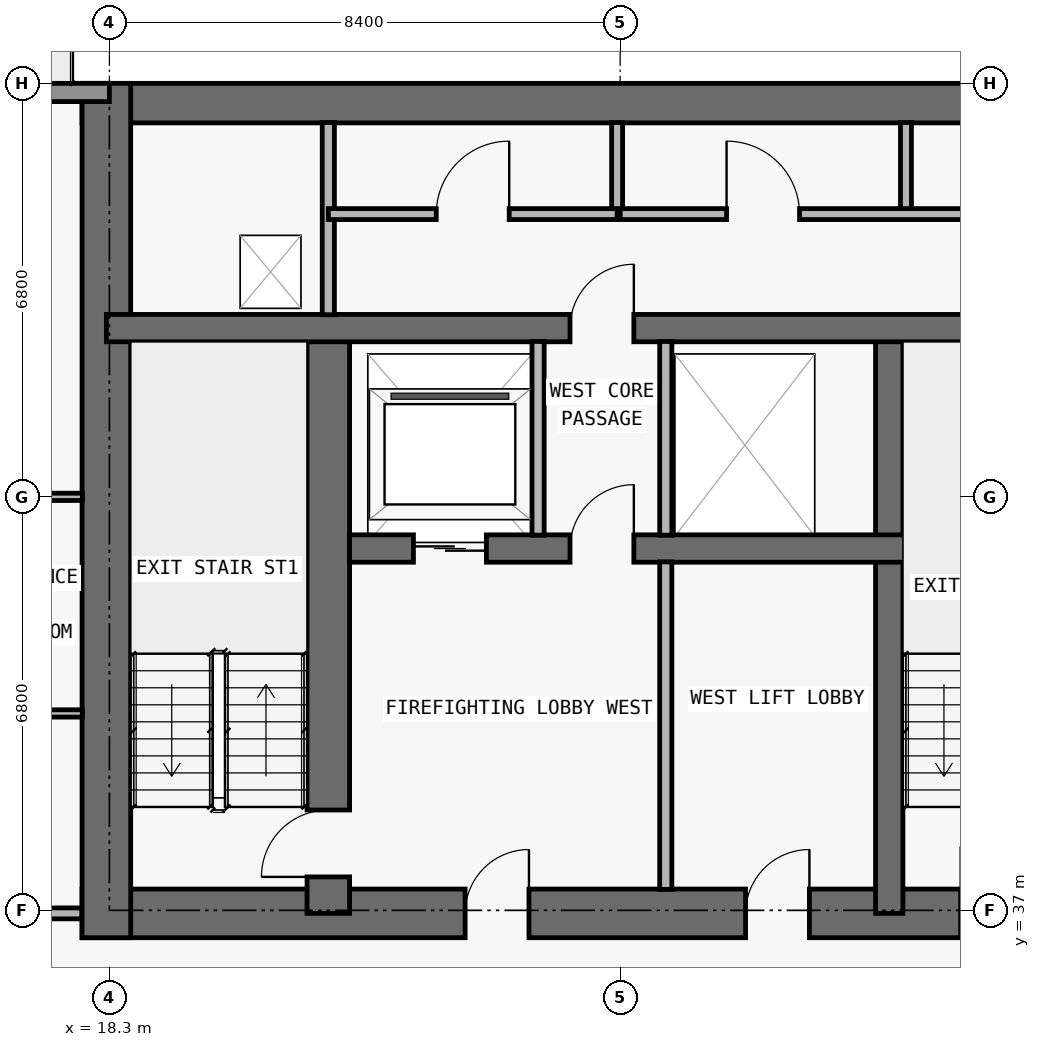
"""IFC4 building model, lengths in metres.
Left out: names, types, materials, properties, quantities, classifications, styles, units other than length and angle.
Written with IfcOpenShell. Run it as: python <this file> out.ifc"""

import sys

from ifc_helpers import new_model, si_unit, direction, frame, frame_2d, origin, place, context, subcontext, project, spatial, rectangle, extrude, element, fill, save


model = new_model("IFC4")
c1 = context("Model", 3, precision=1e-05, world=origin(), true_north=direction((0.0, 1.0)))
c2 = subcontext(c1, "Body", "Model", "MODEL_VIEW")
j1 = project(units=[si_unit("LENGTHUNIT", "METRE"), si_unit("PLANEANGLEUNIT", "RADIAN")], contexts=[c1])
p1 = place(None, origin())
s1 = spatial("IfcSite", under=j1, at=p1, CompositionType="ELEMENT")
p2 = place(p1, origin())
s2 = spatial("IfcBuilding", under=s1, at=p2, CompositionType="ELEMENT")
p3 = place(p2, frame((0.0, 0.0, 109.2)))
s3 = spatial("IfcBuildingStorey", under=s2, at=p3, CompositionType="ELEMENT", Elevation=109.2)
p4 = place(p3, frame((17.85, 36.95, 0.0), z_axis=(0.0, 0.0, 1.0), x_axis=(1.0, 0.0, 0.0)))
e1 = element("IfcWall", 1, at=p4, inside=s3, PredefinedType="SHEAR", context=c2, shape_type="SweptSolid", body=[
    extrude(rectangle(XDim=42.1, YDim=0.8, at=frame_2d((21.05, 0.0))), origin(), (0.0, 0.0, 1.0), 3.05),
])
p5 = place(p4, frame((14.45, 0.0, 0.0)))
e2 = element("IfcOpeningElement", 2, at=p5, cuts=e1, PredefinedType="OPENING", context=c2, shape_type="SweptSolid", body=[
    extrude(rectangle(XDim=1.1, YDim=2.15, at=frame_2d((0.55, 1.075))), frame((0.0, 0.41, 0.0), z_axis=(0.0, -1.0, 0.0), x_axis=(1.0, 0.0, 0.0)), (0.0, 0.0, 1.0), 0.82),
])
p6 = place(p4, frame((6.3, 0.0, 0.0)))
e3 = element("IfcOpeningElement", 3, at=p6, cuts=e1, PredefinedType="OPENING", context=c2, shape_type="SweptSolid", body=[
    extrude(rectangle(XDim=1.05, YDim=2.15, at=frame_2d((0.525, 1.075))), frame((0.0, 0.41, 0.0), z_axis=(0.0, -1.0, 0.0), x_axis=(1.0, 0.0, 0.0)), (0.0, 0.0, 1.0), 0.82),
])
p7 = place(p4, frame((34.8, 0.0, 0.0)))
e4 = element("IfcOpeningElement", 4, at=p7, cuts=e1, PredefinedType="OPENING", context=c2, shape_type="SweptSolid", body=[
    extrude(rectangle(XDim=1.05, YDim=2.15, at=frame_2d((0.525, 1.075))), frame((0.0, 0.41, 0.0), z_axis=(0.0, -1.0, 0.0), x_axis=(1.0, 0.0, 0.0)), (0.0, 0.0, 1.0), 0.82),
])
p8 = place(p4, frame((10.913, 0.0, 0.0)))
e5 = element("IfcOpeningElement", 5, at=p8, cuts=e1, PredefinedType="OPENING", context=c2, shape_type="SweptSolid", body=[
    extrude(rectangle(XDim=1.05, YDim=2.15, at=frame_2d((0.525, 1.075))), frame((0.0, 0.41, 0.0), z_axis=(0.0, -1.0, 0.0), x_axis=(1.0, 0.0, 0.0)), (0.0, 0.0, 1.0), 0.82),
])
p9 = place(p4, frame((24.15, 0.0, 0.0)))
e6 = element("IfcOpeningElement", 6, at=p9, cuts=e1, PredefinedType="OPENING", context=c2, shape_type="SweptSolid", body=[
    extrude(rectangle(XDim=1.05, YDim=2.15, at=frame_2d((0.525, 1.075))), frame((0.0, 0.41, 0.0), z_axis=(0.0, -1.0, 0.0), x_axis=(1.0, 0.0, 0.0)), (0.0, 0.0, 1.0), 0.82),
])
p10 = place(p3, frame((17.85, 50.275, 0.0), z_axis=(0.0, 0.0, 1.0), x_axis=(1.0, 0.0, 0.0)))
e7 = element("IfcWall", 7, at=p10, inside=s3, PredefinedType="SHEAR", context=c2, shape_type="SweptSolid", body=[
    extrude(rectangle(XDim=42.1, YDim=0.65, at=frame_2d((21.05, 0.0))), origin(), (0.0, 0.0, 1.0), 3.05),
])
p11 = place(p3, frame((18.25, 36.55, 0.0), z_axis=(0.0, 0.0, 1.0), x_axis=(0.0, 1.0, 0.0)))
e8 = element("IfcWall", 8, at=p11, inside=s3, PredefinedType="SHEAR", context=c2, shape_type="SweptSolid", body=[
    extrude(rectangle(XDim=14.05, YDim=0.8, at=frame_2d((7.025, 0.0))), origin(), (0.0, 0.0, 1.0), 3.05),
])
p12 = place(p3, frame((21.9, 36.95, 0.0), z_axis=(0.0, 0.0, 1.0), x_axis=(0.0, 1.0, 0.0)))
e9 = element("IfcWall", 9, at=p12, inside=s3, PredefinedType="SHEAR", context=c2, shape_type="SweptSolid", body=[
    extrude(rectangle(XDim=9.625, YDim=0.7, at=frame_2d((4.812, 0.0))), origin(), (0.0, 0.0, 1.0), 3.05),
])
p13 = place(p12, frame((0.6, 0.0, 0.0)))
e10 = element("IfcOpeningElement", 10, at=p13, cuts=e9, PredefinedType="OPENING", context=c2, shape_type="SweptSolid", body=[
    extrude(rectangle(XDim=1.1, YDim=2.15, at=frame_2d((0.55, 1.075))), frame((0.0, 0.36, 0.0), z_axis=(0.0, -1.0, 0.0), x_axis=(1.0, 0.0, 0.0)), (0.0, 0.0, 1.0), 0.72),
])
p14 = place(p3, frame((31.125, 36.95, 0.0), z_axis=(0.0, 0.0, 1.0), x_axis=(0.0, 1.0, 0.0)))
e11 = element("IfcWall", 11, at=p14, inside=s3, PredefinedType="SHEAR", context=c2, shape_type="SweptSolid", body=[
    extrude(rectangle(XDim=9.625, YDim=0.45, at=frame_2d((4.812, 0.0))), origin(), (0.0, 0.0, 1.0), 3.05),
])
p15 = place(p3, frame((22.25, 42.95, 0.0), z_axis=(0.0, 0.0, 1.0), x_axis=(1.0, 0.0, 0.0)))
e12 = element("IfcWall", 12, at=p15, inside=s3, PredefinedType="SHEAR", context=c2, shape_type="SweptSolid", body=[
    extrude(rectangle(XDim=33.3, YDim=0.45, at=frame_2d((16.65, 0.0))), origin(), (0.0, 0.0, 1.0), 3.05),
])
p16 = place(p15, frame((1.05, 0.0, 0.0)))
e13 = element("IfcOpeningElement", 13, at=p16, cuts=e12, PredefinedType="OPENING", context=c2, shape_type="SweptSolid", body=[
    extrude(rectangle(XDim=1.2, YDim=2.2, at=frame_2d((0.6, 1.1))), frame((0.0, 0.235, 0.0), z_axis=(0.0, -1.0, 0.0), x_axis=(1.0, 0.0, 0.0)), (0.0, 0.0, 1.0), 0.47),
])
p17 = place(p15, frame((31.05, 0.0, 0.0)))
e14 = element("IfcOpeningElement", 14, at=p17, cuts=e12, PredefinedType="OPENING", context=c2, shape_type="SweptSolid", body=[
    extrude(rectangle(XDim=1.2, YDim=2.2, at=frame_2d((0.6, 1.1))), frame((0.0, 0.235, 0.0), z_axis=(0.0, -1.0, 0.0), x_axis=(1.0, 0.0, 0.0)), (0.0, 0.0, 1.0), 0.47),
])
p18 = place(p15, frame((21.4, 0.0, 0.0)))
e15 = element("IfcOpeningElement", 15, at=p18, cuts=e12, PredefinedType="OPENING", context=c2, shape_type="SweptSolid", body=[
    extrude(rectangle(XDim=1.1, YDim=2.2, at=frame_2d((0.55, 1.1))), frame((0.0, 0.235, 0.0), z_axis=(0.0, -1.0, 0.0), x_axis=(1.0, 0.0, 0.0)), (0.0, 0.0, 1.0), 0.47),
])
p19 = place(p15, frame((24.0, 0.0, 0.0)))
e16 = element("IfcOpeningElement", 16, at=p19, cuts=e12, PredefinedType="OPENING", context=c2, shape_type="SweptSolid", body=[
    extrude(rectangle(XDim=1.1, YDim=2.2, at=frame_2d((0.55, 1.1))), frame((0.0, 0.235, 0.0), z_axis=(0.0, -1.0, 0.0), x_axis=(1.0, 0.0, 0.0)), (0.0, 0.0, 1.0), 0.47),
])
p20 = place(p15, frame((3.625, 0.0, 0.0)))
e17 = element("IfcOpeningElement", 17, at=p20, cuts=e12, PredefinedType="OPENING", context=c2, shape_type="SweptSolid", body=[
    extrude(rectangle(XDim=1.05, YDim=2.15, at=frame_2d((0.525, 1.075))), frame((0.0, 0.235, 0.0), z_axis=(0.0, -1.0, 0.0), x_axis=(1.0, 0.0, 0.0)), (0.0, 0.0, 1.0), 0.47),
])
p21 = place(p15, frame((28.675, 0.0, 0.0)))
e18 = element("IfcOpeningElement", 18, at=p21, cuts=e12, PredefinedType="OPENING", context=c2, shape_type="SweptSolid", body=[
    extrude(rectangle(XDim=1.05, YDim=2.15, at=frame_2d((0.525, 1.075))), frame((0.0, 0.235, 0.0), z_axis=(0.0, -1.0, 0.0), x_axis=(1.0, 0.0, 0.0)), (0.0, 0.0, 1.0), 0.47),
])
p22 = place(p15, frame((13.925, 0.0, 0.0)))
e19 = element("IfcOpeningElement", 19, at=p22, cuts=e12, PredefinedType="OPENING", context=c2, shape_type="SweptSolid", body=[
    extrude(rectangle(XDim=1.0, YDim=2.2, at=frame_2d((0.5, 1.1))), frame((0.0, 0.235, 0.0), z_axis=(0.0, -1.0, 0.0), x_axis=(1.0, 0.0, 0.0)), (0.0, 0.0, 1.0), 0.47),
])
p23 = place(p15, frame((18.05, 0.0, 0.0)))
e20 = element("IfcOpeningElement", 20, at=p23, cuts=e12, PredefinedType="OPENING", context=c2, shape_type="SweptSolid", body=[
    extrude(rectangle(XDim=1.0, YDim=2.2, at=frame_2d((0.5, 1.1))), frame((0.0, 0.235, 0.0), z_axis=(0.0, -1.0, 0.0), x_axis=(1.0, 0.0, 0.0)), (0.0, 0.0, 1.0), 0.47),
])
p24 = place(p3, frame((18.25, 46.575, 0.0), z_axis=(0.0, 0.0, 1.0), x_axis=(1.0, 0.0, 0.0)))
e21 = element("IfcWall", 21, at=p24, inside=s3, PredefinedType="SHEAR", context=c2, shape_type="SweptSolid", body=[
    extrude(rectangle(XDim=41.3, YDim=0.45, at=frame_2d((20.65, 0.0))), origin(), (0.0, 0.0, 1.0), 3.05),
])
p25 = place(p24, frame((7.625, 0.0, 0.0)))
e22 = element("IfcOpeningElement", 22, at=p25, cuts=e21, PredefinedType="OPENING", context=c2, shape_type="SweptSolid", body=[
    extrude(rectangle(XDim=1.05, YDim=2.15, at=frame_2d((0.525, 1.075))), frame((0.0, 0.235, 0.0), z_axis=(0.0, -1.0, 0.0), x_axis=(1.0, 0.0, 0.0)), (0.0, 0.0, 1.0), 0.47),
])
p26 = place(p24, frame((32.675, 0.0, 0.0)))
e23 = element("IfcOpeningElement", 23, at=p26, cuts=e21, PredefinedType="OPENING", context=c2, shape_type="SweptSolid", body=[
    extrude(rectangle(XDim=1.05, YDim=2.15, at=frame_2d((0.525, 1.075))), frame((0.0, 0.235, 0.0), z_axis=(0.0, -1.0, 0.0), x_axis=(1.0, 0.0, 0.0)), (0.0, 0.0, 1.0), 0.47),
])
p27 = place(p3, frame((7.7, 50.45, 0.0), z_axis=(0.0, 0.0, 1.0), x_axis=(1.0, 0.0, 0.0)))
e24 = element("IfcWall", 24, at=p27, inside=s3, PredefinedType="STANDARD", context=c2, shape_type="SweptSolid", body=[
    extrude(rectangle(XDim=10.6, YDim=0.3, at=frame_2d((5.3, 0.0))), origin(), (0.0, 0.0, 1.0), 3.05),
])
p28 = place(p27, frame((4.3, 0.0, 0.0)))
e25 = element("IfcOpeningElement", 25, at=p28, cuts=e24, PredefinedType="OPENING", context=c2, shape_type="SweptSolid", body=[
    extrude(rectangle(XDim=2.0, YDim=2.3, at=frame_2d((1.0, 1.15))), frame((0.0, 0.16, 0.0), z_axis=(0.0, -1.0, 0.0), x_axis=(1.0, 0.0, 0.0)), (0.0, 0.0, 1.0), 0.32),
])
p29 = place(p3, frame((21.9, 46.795, 0.0), z_axis=(0.0, 0.0, 1.0), x_axis=(0.0, 1.0, 0.0)))
e26 = element("IfcWall", 26, at=p29, inside=s3, PredefinedType="PARTITIONING", context=c2, shape_type="SweptSolid", body=[
    extrude(rectangle(XDim=3.16, YDim=0.2, at=frame_2d((1.58, 0.0))), origin(), (0.0, 0.0, 1.0), 3.05),
])
p30 = place(p3, frame((25.35, 43.17, 0.0), z_axis=(0.0, 0.0, 1.0), x_axis=(0.0, 1.0, 0.0)))
e27 = element("IfcWall", 27, at=p30, inside=s3, PredefinedType="PARTITIONING", context=c2, shape_type="SweptSolid", body=[
    extrude(rectangle(XDim=3.185, YDim=0.2, at=frame_2d((1.593, 0.0))), origin(), (0.0, 0.0, 1.0), 3.05),
])
p31 = place(p3, frame((26.65, 48.45, 0.0), z_axis=(0.0, 0.0, 1.0), x_axis=(0.0, 1.0, 0.0)))
e28 = element("IfcWall", 28, at=p31, inside=s3, PredefinedType="PARTITIONING", context=c2, shape_type="SweptSolid", body=[
    extrude(rectangle(XDim=1.505, YDim=0.18, at=frame_2d((0.752, 0.0))), origin(), (0.0, 0.0, 1.0), 3.05),
])
p32 = place(p3, frame((27.45, 37.345, 0.0), z_axis=(0.0, 0.0, 1.0), x_axis=(0.0, 1.0, 0.0)))
e29 = element("IfcWall", 29, at=p32, inside=s3, PredefinedType="PARTITIONING", context=c2, shape_type="SweptSolid", body=[
    extrude(rectangle(XDim=5.385, YDim=0.2, at=frame_2d((2.692, 0.0))), origin(), (0.0, 0.0, 1.0), 3.05),
])
p33 = place(p3, frame((27.45, 43.17, 0.0), z_axis=(0.0, 0.0, 1.0), x_axis=(0.0, 1.0, 0.0)))
e30 = element("IfcWall", 30, at=p33, inside=s3, PredefinedType="PARTITIONING", context=c2, shape_type="SweptSolid", body=[
    extrude(rectangle(XDim=3.185, YDim=0.2, at=frame_2d((1.593, 0.0))), origin(), (0.0, 0.0, 1.0), 3.05),
])
p34 = place(p3, frame((31.4, 48.45, 0.0), z_axis=(0.0, 0.0, 1.0), x_axis=(0.0, 1.0, 0.0)))
e31 = element("IfcWall", 31, at=p34, inside=s3, PredefinedType="PARTITIONING", context=c2, shape_type="SweptSolid", body=[
    extrude(rectangle(XDim=1.505, YDim=0.18, at=frame_2d((0.752, 0.0))), origin(), (0.0, 0.0, 1.0), 3.05),
])
p35 = place(p3, frame((7.7, 36.95, 0.0), z_axis=(0.0, 0.0, 1.0), x_axis=(1.0, 0.0, 0.0)))
e32 = element("IfcWall", 32, at=p35, inside=s3, PredefinedType="PARTITIONING", context=c2, shape_type="SweptSolid", body=[
    extrude(rectangle(XDim=10.145, YDim=0.18, at=frame_2d((5.073, 0.0))), origin(), (0.0, 0.0, 1.0), 3.05),
])
p36 = place(p35, frame((5.188, 0.0, 0.0)))
e33 = element("IfcOpeningElement", 33, at=p36, cuts=e32, PredefinedType="OPENING", context=c2, shape_type="SweptSolid", body=[
    extrude(rectangle(XDim=1.0, YDim=2.2, at=frame_2d((0.5, 1.1))), frame((0.0, 0.1, 0.0), z_axis=(0.0, -1.0, 0.0), x_axis=(1.0, 0.0, 0.0)), (0.0, 0.0, 1.0), 0.2),
])
p37 = place(p3, frame((15.6, 40.238, 0.0), z_axis=(0.0, 0.0, 1.0), x_axis=(1.0, 0.0, 0.0)))
e34 = element("IfcWall", 34, at=p37, inside=s3, PredefinedType="PARTITIONING", context=c2, shape_type="SweptSolid", body=[
    extrude(rectangle(XDim=2.255, YDim=0.12, at=frame_2d((1.127, 0.0))), origin(), (0.0, 0.0, 1.0), 3.05),
])
p38 = place(p3, frame((4.195, 43.8, 0.0), z_axis=(0.0, 0.0, 1.0), x_axis=(1.0, 0.0, 0.0)))
e35 = element("IfcWall", 35, at=p38, inside=s3, PredefinedType="PARTITIONING", context=c2, shape_type="SweptSolid", body=[
    extrude(rectangle(XDim=13.66, YDim=0.12, at=frame_2d((6.83, 0.0))), origin(), (0.0, 0.0, 1.0), 2.339),
])
p39 = place(p38, frame((8.743, 0.0, 0.0)))
e36 = element("IfcOpeningElement", 36, at=p39, cuts=e35, PredefinedType="OPENING", context=c2, shape_type="SweptSolid", body=[
    extrude(rectangle(XDim=0.9, YDim=2.15, at=frame_2d((0.45, 1.075))), frame((0.0, 0.07, 0.0), z_axis=(0.0, -1.0, 0.0), x_axis=(1.0, 0.0, 0.0)), (0.0, 0.0, 1.0), 0.14),
])
p40 = place(p38, frame((12.107, 0.0, 0.0)))
e37 = element("IfcOpeningElement", 37, at=p40, cuts=e35, PredefinedType="OPENING", context=c2, shape_type="SweptSolid", body=[
    extrude(rectangle(XDim=0.85, YDim=2.1, at=frame_2d((0.425, 1.05))), frame((0.0, 0.07, 0.0), z_axis=(0.0, -1.0, 0.0), x_axis=(1.0, 0.0, 0.0)), (0.0, 0.0, 1.0), 0.14),
])
p41 = place(p3, frame((21.9, 48.45, 0.0), z_axis=(0.0, 0.0, 1.0), x_axis=(1.0, 0.0, 0.0)))
e38 = element("IfcWall", 38, at=p41, inside=s3, PredefinedType="PARTITIONING", context=c2, shape_type="SweptSolid", body=[
    extrude(rectangle(XDim=4.75, YDim=0.18, at=frame_2d((2.375, 0.0))), origin(), (0.0, 0.0, 1.0), 3.05),
])
p42 = place(p41, frame((1.775, 0.0, 0.0)))
e39 = element("IfcOpeningElement", 39, at=p42, cuts=e38, PredefinedType="OPENING", context=c2, shape_type="SweptSolid", body=[
    extrude(rectangle(XDim=1.2, YDim=2.2, at=frame_2d((0.6, 1.1))), frame((0.0, 0.1, 0.0), z_axis=(0.0, -1.0, 0.0), x_axis=(1.0, 0.0, 0.0)), (0.0, 0.0, 1.0), 0.2),
])
p43 = place(p3, frame((26.7, 48.45, 0.0), z_axis=(0.0, 0.0, 1.0), x_axis=(1.0, 0.0, 0.0)))
e40 = element("IfcWall", 40, at=p43, inside=s3, PredefinedType="PARTITIONING", context=c2, shape_type="SweptSolid", body=[
    extrude(rectangle(XDim=29.2, YDim=0.18, at=frame_2d((14.6, 0.0))), origin(), (0.0, 0.0, 1.0), 3.05),
])
p44 = place(p43, frame((1.75, 0.0, 0.0)))
e41 = element("IfcOpeningElement", 41, at=p44, cuts=e40, PredefinedType="OPENING", context=c2, shape_type="SweptSolid", body=[
    extrude(rectangle(XDim=1.2, YDim=2.2, at=frame_2d((0.6, 1.1))), frame((0.0, 0.1, 0.0), z_axis=(0.0, -1.0, 0.0), x_axis=(1.0, 0.0, 0.0)), (0.0, 0.0, 1.0), 0.2),
])
p45 = place(p43, frame((6.475, 0.0, 0.0)))
e42 = element("IfcOpeningElement", 42, at=p45, cuts=e40, PredefinedType="OPENING", context=c2, shape_type="SweptSolid", body=[
    extrude(rectangle(XDim=1.2, YDim=2.2, at=frame_2d((0.6, 1.1))), frame((0.0, 0.1, 0.0), z_axis=(0.0, -1.0, 0.0), x_axis=(1.0, 0.0, 0.0)), (0.0, 0.0, 1.0), 0.2),
])
p46 = place(p43, frame((14.05, 0.0, 0.0)))
e43 = element("IfcOpeningElement", 43, at=p46, cuts=e40, PredefinedType="OPENING", context=c2, shape_type="SweptSolid", body=[
    extrude(rectangle(XDim=1.0, YDim=2.2, at=frame_2d((0.5, 1.1))), frame((0.0, 0.1, 0.0), z_axis=(0.0, -1.0, 0.0), x_axis=(1.0, 0.0, 0.0)), (0.0, 0.0, 1.0), 0.2),
])
p47 = place(p43, frame((21.425, 0.0, 0.0)))
e44 = element("IfcOpeningElement", 44, at=p47, cuts=e40, PredefinedType="OPENING", context=c2, shape_type="SweptSolid", body=[
    extrude(rectangle(XDim=1.2, YDim=2.2, at=frame_2d((0.6, 1.1))), frame((0.0, 0.1, 0.0), z_axis=(0.0, -1.0, 0.0), x_axis=(1.0, 0.0, 0.0)), (0.0, 0.0, 1.0), 0.2),
])
p48 = place(p43, frame((26.375, 0.0, 0.0)))
e45 = element("IfcOpeningElement", 45, at=p48, cuts=e40, PredefinedType="OPENING", context=c2, shape_type="SweptSolid", body=[
    extrude(rectangle(XDim=0.85, YDim=2.1, at=frame_2d((0.425, 1.05))), frame((0.0, 0.1, 0.0), z_axis=(0.0, -1.0, 0.0), x_axis=(1.0, 0.0, 0.0)), (0.0, 0.0, 1.0), 0.2),
])
p49 = place(p16, origin())
e46 = element("IfcDoor", 46, at=p49, inside=s3, OperationType="DOUBLE_DOOR_SLIDING", PredefinedType="DOOR", context=c2, shape_type="SweptSolid", body=[
    extrude(rectangle(XDim=1.2, YDim=2.2, at=frame_2d((0.6, 1.1))), frame((0.0, 0.025, 0.0), z_axis=(0.0, -1.0, 0.0), x_axis=(1.0, 0.0, 0.0)), (0.0, 0.0, 1.0), 0.05),
])
fill(e13, e46)
p50 = place(p6, origin())
e47 = element("IfcDoor", 47, at=p50, inside=s3, OperationType="SINGLE_SWING_RIGHT", PredefinedType="DOOR", context=c2, shape_type="SweptSolid", body=[
    extrude(rectangle(XDim=1.05, YDim=2.15, at=frame_2d((0.525, 1.075))), frame((0.0, 0.025, 0.0), z_axis=(0.0, -1.0, 0.0), x_axis=(1.0, 0.0, 0.0)), (0.0, 0.0, 1.0), 0.05),
])
fill(e3, e47)
p51 = place(p13, origin())
e48 = element("IfcDoor", 48, at=p51, inside=s3, OperationType="SINGLE_SWING_LEFT", PredefinedType="DOOR", context=c2, shape_type="SweptSolid", body=[
    extrude(rectangle(XDim=1.1, YDim=2.15, at=frame_2d((0.55, 1.075))), frame((0.0, 0.025, 0.0), z_axis=(0.0, -1.0, 0.0), x_axis=(1.0, 0.0, 0.0)), (0.0, 0.0, 1.0), 0.05),
])
fill(e10, e48)
p52 = place(p20, origin())
e49 = element("IfcDoor", 49, at=p52, inside=s3, OperationType="SINGLE_SWING_RIGHT", PredefinedType="DOOR", context=c2, shape_type="SweptSolid", body=[
    extrude(rectangle(XDim=1.05, YDim=2.15, at=frame_2d((0.525, 1.075))), frame((0.0, 0.025, 0.0), z_axis=(0.0, -1.0, 0.0), x_axis=(1.0, 0.0, 0.0)), (0.0, 0.0, 1.0), 0.05),
])
fill(e17, e49)
p53 = place(p8, origin())
e50 = element("IfcDoor", 50, at=p53, inside=s3, OperationType="SINGLE_SWING_RIGHT", PredefinedType="DOOR", context=c2, shape_type="SweptSolid", body=[
    extrude(rectangle(XDim=1.05, YDim=2.15, at=frame_2d((0.525, 1.075))), frame((0.0, 0.025, 0.0), z_axis=(0.0, -1.0, 0.0), x_axis=(1.0, 0.0, 0.0)), (0.0, 0.0, 1.0), 0.05),
])
fill(e5, e50)
p54 = place(p25, origin())
e51 = element("IfcDoor", 51, at=p54, inside=s3, OperationType="SINGLE_SWING_RIGHT", PredefinedType="DOOR", context=c2, shape_type="SweptSolid", body=[
    extrude(rectangle(XDim=1.05, YDim=2.15, at=frame_2d((0.525, 1.075))), frame((0.0, 0.025, 0.0), z_axis=(0.0, -1.0, 0.0), x_axis=(1.0, 0.0, 0.0)), (0.0, 0.0, 1.0), 0.05),
])
fill(e22, e51)
p55 = place(p42, origin())
e52 = element("IfcDoor", 52, at=p55, inside=s3, OperationType="SINGLE_SWING_RIGHT", PredefinedType="DOOR", context=c2, shape_type="SweptSolid", body=[
    extrude(rectangle(XDim=1.2, YDim=2.2, at=frame_2d((0.6, 1.1))), frame((0.0, 0.025, 0.0), z_axis=(0.0, -1.0, 0.0), x_axis=(1.0, 0.0, 0.0)), (0.0, 0.0, 1.0), 0.05),
])
fill(e39, e52)
p56 = place(p44, origin())
e53 = element("IfcDoor", 53, at=p56, inside=s3, OperationType="SINGLE_SWING_LEFT", PredefinedType="DOOR", context=c2, shape_type="SweptSolid", body=[
    extrude(rectangle(XDim=1.2, YDim=2.2, at=frame_2d((0.6, 1.1))), frame((0.0, 0.025, 0.0), z_axis=(0.0, -1.0, 0.0), x_axis=(1.0, 0.0, 0.0)), (0.0, 0.0, 1.0), 0.05),
])
fill(e41, e53)
save(model, sys.argv[1])
